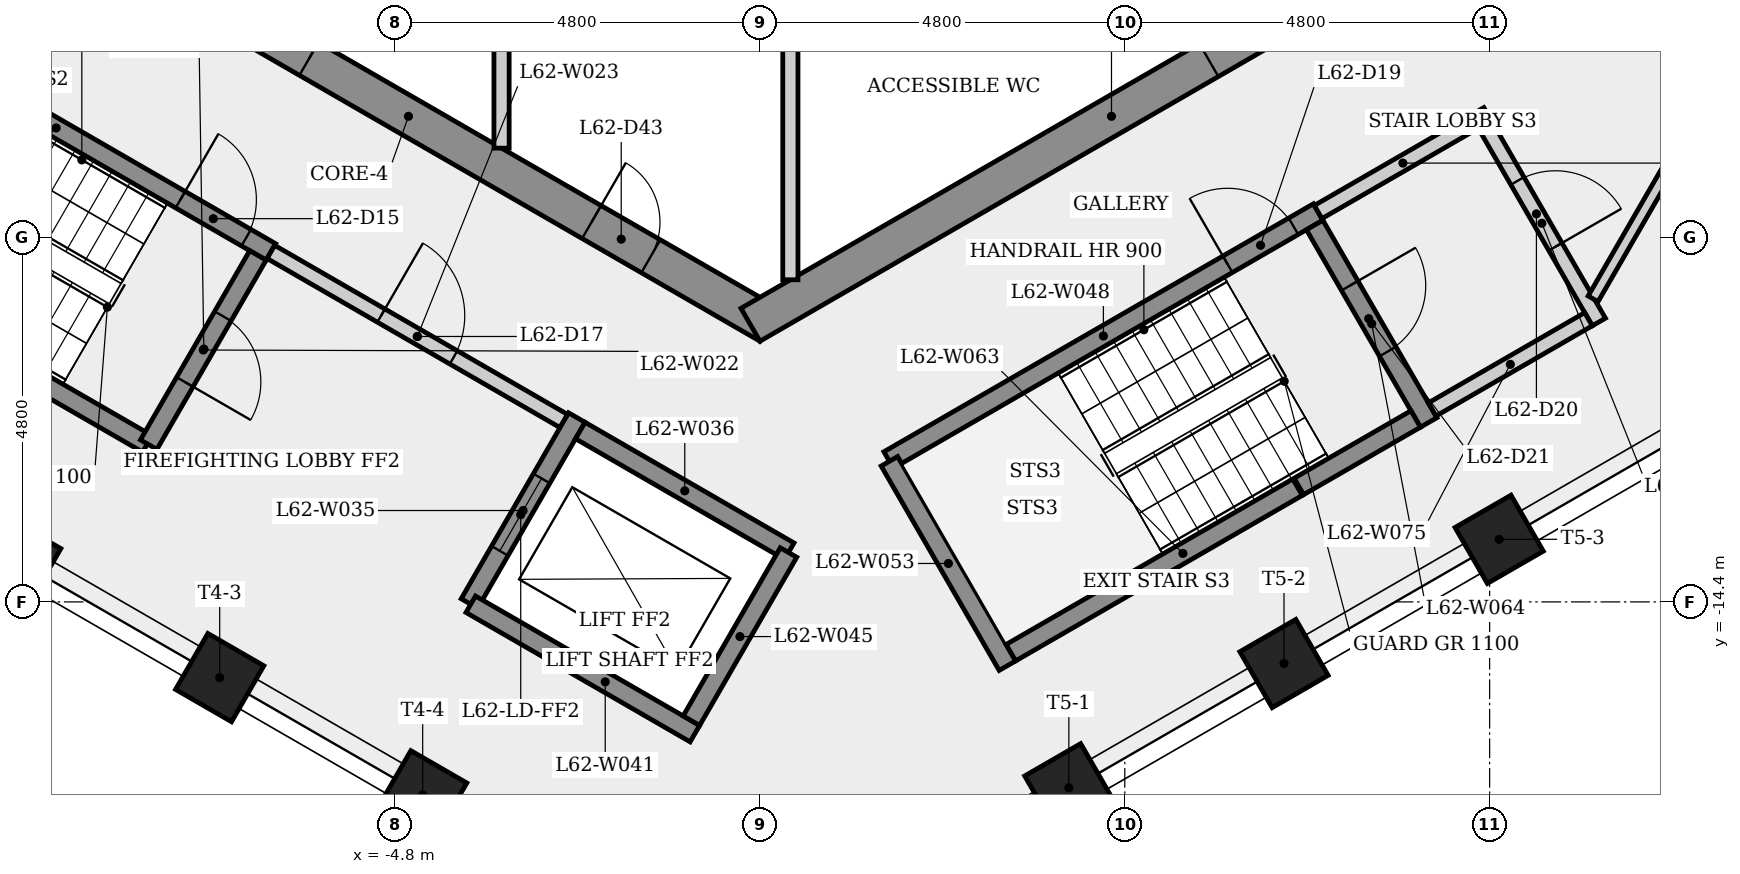
"""IFC4 building model, lengths in metres.
Left out: names, types, materials, properties, quantities, classifications, styles, units other than length and angle.
Written with IfcOpenShell. Run it as: python <this file> out.ifc"""

import sys

from ifc_helpers import new_model, si_unit, direction, frame, frame_2d, origin, origin_2d, place, context, subcontext, project, spatial, rectangle, extrude, element, fill, save


model = new_model("IFC4")
c1 = context("Model", 3, precision=1e-05, world=origin(), true_north=direction((0.0, 1.0)))
c2 = subcontext(c1, "Body", "Model", "MODEL_VIEW")
j1 = project(units=[si_unit("LENGTHUNIT", "METRE"), si_unit("PLANEANGLEUNIT", "RADIAN")], contexts=[c1])
p1 = place(None, origin())
s1 = spatial("IfcSite", under=j1, at=p1, CompositionType="ELEMENT")
p2 = place(p1, origin())
s2 = spatial("IfcBuilding", under=s1, at=p2, CompositionType="ELEMENT")
p3 = place(p2, frame((0.0, 0.0, 232.5)))
s3 = spatial("IfcBuildingStorey", under=s2, at=p3, CompositionType="ELEMENT", Elevation=232.5)
p4 = place(p3, frame((-9.375, -5.268, 0.0), z_axis=(0.0, 0.0, 1.0), x_axis=(0.866023993627, -0.500002442456, 0.0)))
e1 = element("IfcWall", 1, at=p4, inside=s3, PredefinedType="SHEAR", context=c2, shape_type="SweptSolid", body=[
    extrude(rectangle(XDim=10.97, YDim=0.5, at=frame_2d((5.485, 0.0))), origin(), (0.0, 0.0, 1.0), 3.4),
])
p5 = place(p4, frame((3.073, 0.0, 0.0)))
e2 = element("IfcOpeningElement", 2, at=p5, cuts=e1, PredefinedType="OPENING", context=c2, shape_type="SweptSolid", body=[
    extrude(rectangle(XDim=0.9, YDim=2.1, at=frame_2d((0.45, 1.05))), frame((0.0, 0.26, 0.0), z_axis=(0.0, -1.0, 0.0), x_axis=(1.0, 0.0, 0.0)), (0.0, 0.0, 1.0), 0.52),
])
p6 = place(p4, frame((8.267, 0.0, 0.0)))
e3 = element("IfcOpeningElement", 3, at=p6, cuts=e1, PredefinedType="OPENING", context=c2, shape_type="SweptSolid", body=[
    extrude(rectangle(XDim=0.9, YDim=2.1, at=frame_2d((0.45, 1.05))), frame((0.0, 0.26, 0.0), z_axis=(0.0, -1.0, 0.0), x_axis=(1.0, 0.0, 0.0)), (0.0, 0.0, 1.0), 0.52),
])
p7 = place(p3, frame((-0.125, -10.753, 0.0), z_axis=(0.0, 0.0, 1.0), x_axis=(0.866023993627, 0.500002442456, 0.0)))
e4 = element("IfcWall", 4, at=p7, inside=s3, PredefinedType="SHEAR", context=c2, shape_type="SweptSolid", body=[
    extrude(rectangle(XDim=10.97, YDim=0.5, at=frame_2d((5.485, 0.0))), origin(), (0.0, 0.0, 1.0), 3.4),
])
p8 = place(p7, frame((6.964, 0.0, 0.0)))
e5 = element("IfcOpeningElement", 5, at=p8, cuts=e4, PredefinedType="OPENING", context=c2, shape_type="SweptSolid", body=[
    extrude(rectangle(XDim=0.9, YDim=2.1, at=frame_2d((0.45, 1.05))), frame((0.0, 0.26, 0.0), z_axis=(0.0, -1.0, 0.0), x_axis=(1.0, 0.0, 0.0)), (0.0, 0.0, 1.0), 0.52),
])
for number, where, z_axis, x_axis in (
    (6, (-9.779, -13.854, 0.0), (0.0, 0.0, 1.0), (-0.5, -0.866, 0.0)),
    (7, (-7.108, -15.396, 0.0), (0.0, 0.0, 1.0), (-0.5, -0.866, 0.0)),
    (8, (-4.438, -16.938, 0.0), (0.0, 0.0, 1.0), (-0.5, -0.866, 0.0)),
    (9, (4.064, -16.845, 0.0), (0.0, 0.0, 1.0), (0.5, -0.866, 0.0)),
    (10, (6.895, -15.211, 0.0), (0.0, 0.0, 1.0), (0.5, -0.866, 0.0)),
    (11, (9.726, -13.576, 0.0), (0.0, 0.0, 1.0), (0.5, -0.866, 0.0)),
):
    element("IfcColumn", number, at=place(p3, frame(where, z_axis=z_axis, x_axis=x_axis)), inside=s3, PredefinedType="COLUMN", context=c2, shape_type="SweptSolid", body=[
        extrude(rectangle(XDim=0.85, YDim=0.85, at=origin_2d()), origin(), (0.0, 0.0, 1.0), 3.4),
    ])
p9 = place(p3, frame((-12.085, -6.532, 0.0), z_axis=(0.0, 0.0, 1.0), x_axis=(0.866031063448, -0.499990197047, 0.0)))
e12 = element("IfcWall", 12, at=p9, inside=s3, PredefinedType="SHEAR", context=c2, shape_type="SweptSolid", body=[
    extrude(rectangle(XDim=6.525, YDim=0.25, at=frame_2d((3.263, 0.0))), origin(), (0.0, 0.0, 1.0), 3.05),
])
p10 = place(p9, frame((5.15, 0.0, 0.0)))
e13 = element("IfcOpeningElement", 13, at=p10, cuts=e12, PredefinedType="OPENING", context=c2, shape_type="SweptSolid", body=[
    extrude(rectangle(XDim=1.0, YDim=2.1, at=frame_2d((0.5, 1.05))), frame((0.0, 0.135, 0.0), z_axis=(0.0, -1.0, 0.0), x_axis=(1.0, 0.0, 0.0)), (0.0, 0.0, 1.0), 0.27),
])
p11 = place(p3, frame((-8.06, -12.321, 0.0), z_axis=(0.0, 0.0, 1.0), x_axis=(-0.866029591389, 0.499992746786, 0.0)))
e14 = element("IfcWall", 14, at=p11, inside=s3, PredefinedType="SHEAR", context=c2, shape_type="SweptSolid", body=[
    extrude(rectangle(XDim=6.255, YDim=0.25, at=frame_2d((3.127, 0.0))), origin(), (0.0, 0.0, 1.0), 3.05),
])
p12 = place(p3, frame((-6.605, -9.841, 0.0), z_axis=(0.0, 0.0, 1.0), x_axis=(-0.500011588718, -0.866018712932, 0.0)))
e15 = element("IfcWall", 15, at=p12, inside=s3, PredefinedType="SHEAR", context=c2, shape_type="SweptSolid", body=[
    extrude(rectangle(XDim=2.875, YDim=0.25, at=frame_2d((1.438, 0.0))), origin(), (0.0, 0.0, 1.0), 3.05),
])
p13 = place(p12, frame((0.923, 0.0, 0.0)))
e16 = element("IfcOpeningElement", 16, at=p13, cuts=e15, PredefinedType="OPENING", context=c2, shape_type="SweptSolid", body=[
    extrude(rectangle(XDim=1.0, YDim=2.1, at=frame_2d((0.5, 1.05))), frame((0.0, 0.135, 0.0), z_axis=(0.0, -1.0, 0.0), x_axis=(1.0, 0.0, 0.0)), (0.0, 0.0, 1.0), 0.27),
])
p14 = place(p3, frame((-6.435, -9.795, 0.0), z_axis=(0.0, 0.0, 1.0), x_axis=(0.866012907634, -0.500021643343, 0.0)))
e17 = element("IfcWall", 17, at=p14, inside=s3, PredefinedType="PARTITIONING", context=c2, shape_type="SweptSolid", body=[
    extrude(rectangle(XDim=4.45, YDim=0.2, at=frame_2d((2.225, 0.0))), origin(), (0.0, 0.0, 1.0), 3.05),
])
p15 = place(p14, frame((1.675, 0.0, 0.0)))
e18 = element("IfcOpeningElement", 18, at=p15, cuts=e17, PredefinedType="OPENING", context=c2, shape_type="SweptSolid", body=[
    extrude(rectangle(XDim=1.1, YDim=2.1, at=frame_2d((0.55, 1.05))), frame((0.0, 0.11, 0.0), z_axis=(0.0, -1.0, 0.0), x_axis=(1.0, 0.0, 0.0)), (0.0, 0.0, 1.0), 0.22),
])
p16 = place(p3, frame((-3.4, -5.25, 0.0), z_axis=(0.0, 0.0, 1.0), x_axis=(0.0, -1.0, 0.0)))
e19 = element("IfcWall", 19, at=p16, inside=s3, PredefinedType="PARTITIONING", context=c2, shape_type="SweptSolid", body=[
    extrude(rectangle(XDim=3.179, YDim=0.2, at=frame_2d((1.59, 0.0))), origin(), (0.0, 0.0, 1.0), 3.05),
])
p17 = place(p3, frame((-2.41, -11.974, 0.0), z_axis=(0.0, 0.0, 1.0), x_axis=(-0.49998675294, -0.866033051843, 0.0)))
e20 = element("IfcWall", 20, at=p17, inside=s3, PredefinedType="SHEAR", context=c2, shape_type="SweptSolid", body=[
    extrude(rectangle(XDim=2.825, YDim=0.25, at=frame_2d((1.413, 0.0))), origin(), (0.0, 0.0, 1.0), 3.05),
])
p18 = place(p17, frame((0.926, 0.0, 0.0)))
e21 = element("IfcOpeningElement", 21, at=p18, cuts=e20, PredefinedType="OPENING", context=c2, shape_type="SweptSolid", body=[
    extrude(rectangle(XDim=1.1, YDim=2.1, at=frame_2d((0.55, 1.05))), frame((0.0, 0.135, 0.0), z_axis=(0.0, -1.0, 0.0), x_axis=(1.0, 0.0, 0.0)), (0.0, 0.0, 1.0), 0.27),
])
p19 = place(p3, frame((-2.364, -12.145, 0.0), z_axis=(0.0, 0.0, 1.0), x_axis=(0.866048579423, -0.499959856469, 0.0)))
e22 = element("IfcWall", 22, at=p19, inside=s3, PredefinedType="SHEAR", context=c2, shape_type="SweptSolid", body=[
    extrude(rectangle(XDim=3.175, YDim=0.25, at=frame_2d((1.587, 0.0))), origin(), (0.0, 0.0, 1.0), 3.4),
])
p20 = place(p3, frame((-0.856, -16.133, 0.0), z_axis=(0.0, 0.0, 1.0), x_axis=(-0.866032748241, 0.499987278812, 0.0)))
e23 = element("IfcWall", 23, at=p20, inside=s3, PredefinedType="SHEAR", context=c2, shape_type="SweptSolid", body=[
    extrude(rectangle(XDim=3.405, YDim=0.25, at=frame_2d((1.702, 0.0))), origin(), (0.0, 0.0, 1.0), 3.05),
])
p21 = place(p3, frame((0.375, -13.75, 0.0), z_axis=(0.0, 0.0, 1.0), x_axis=(-0.50003400563, -0.866005769735, 0.0)))
e24 = element("IfcWall", 24, at=p21, inside=s3, PredefinedType="SHEAR", context=c2, shape_type="SweptSolid", body=[
    extrude(rectangle(XDim=2.555, YDim=0.25, at=frame_2d((1.277, 0.0))), origin(), (0.0, 0.0, 1.0), 3.4),
])
p22 = place(p3, frame((0.4, -5.25, 0.0), z_axis=(0.0, 0.0, 1.0), x_axis=(0.0, -1.0, 0.0)))
e25 = element("IfcWall", 25, at=p22, inside=s3, PredefinedType="PARTITIONING", context=c2, shape_type="SweptSolid", body=[
    extrude(rectangle(XDim=4.911, YDim=0.2, at=frame_2d((2.456, 0.0))), origin(), (0.0, 0.0, 1.0), 3.05),
])
p23 = place(p3, frame((1.693, -12.532, 0.0), z_axis=(0.0, 0.0, 1.0), x_axis=(0.866031063448, 0.499990197047, 0.0)))
e26 = element("IfcWall", 26, at=p23, inside=s3, PredefinedType="SHEAR", context=c2, shape_type="SweptSolid", body=[
    extrude(rectangle(XDim=6.525, YDim=0.25, at=frame_2d((3.263, 0.0))), origin(), (0.0, 0.0, 1.0), 3.05),
])
p24 = place(p23, frame((5.15, 0.0, 0.0)))
e27 = element("IfcOpeningElement", 27, at=p24, cuts=e26, PredefinedType="OPENING", context=c2, shape_type="SweptSolid", body=[
    extrude(rectangle(XDim=1.0, YDim=2.1, at=frame_2d((0.5, 1.05))), frame((0.0, 0.135, 0.0), z_axis=(0.0, -1.0, 0.0), x_axis=(1.0, 0.0, 0.0)), (0.0, 0.0, 1.0), 0.27),
])
p25 = place(p3, frame((3.256, -15.239, 0.0), z_axis=(0.0, 0.0, 1.0), x_axis=(-0.500003782172, 0.866023220135, 0.0)))
e28 = element("IfcWall", 28, at=p25, inside=s3, PredefinedType="SHEAR", context=c2, shape_type="SweptSolid", body=[
    extrude(rectangle(XDim=3.105, YDim=0.25, at=frame_2d((1.552, 0.0))), origin(), (0.0, 0.0, 1.0), 3.05),
])
p26 = place(p3, frame((7.073, -12.891, 0.0), z_axis=(0.0, 0.0, 1.0), x_axis=(-0.866023145199, -0.500003911965, 0.0)))
e29 = element("IfcWall", 29, at=p26, inside=s3, PredefinedType="SHEAR", context=c2, shape_type="SweptSolid", body=[
    extrude(rectangle(XDim=4.355, YDim=0.25, at=frame_2d((2.177, 0.0))), origin(), (0.0, 0.0, 1.0), 3.05),
])
p27 = place(p3, frame((7.298, -9.441, 0.0), z_axis=(0.0, 0.0, 1.0), x_axis=(0.50002537861, -0.866010750942, 0.0)))
e30 = element("IfcWall", 30, at=p27, inside=s3, PredefinedType="SHEAR", context=c2, shape_type="SweptSolid", body=[
    extrude(rectangle(XDim=3.0, YDim=0.25, at=frame_2d((1.5, 0.0))), origin(), (0.0, 0.0, 1.0), 3.05),
])
p28 = place(p27, frame((0.923, 0.0, 0.0)))
e31 = element("IfcOpeningElement", 31, at=p28, cuts=e30, PredefinedType="OPENING", context=c2, shape_type="SweptSolid", body=[
    extrude(rectangle(XDim=1.0, YDim=2.1, at=frame_2d((0.5, 1.05))), frame((0.0, 0.135, 0.0), z_axis=(0.0, -1.0, 0.0), x_axis=(1.0, 0.0, 0.0)), (0.0, 0.0, 1.0), 0.27),
])
p29 = place(p3, frame((7.344, -9.27, 0.0), z_axis=(0.0, 0.0, 1.0), x_axis=(0.866005588531, 0.500034319456, 0.0)))
e32 = element("IfcWall", 32, at=p29, inside=s3, PredefinedType="PARTITIONING", context=c2, shape_type="SweptSolid", body=[
    extrude(rectangle(XDim=2.575, YDim=0.2, at=frame_2d((1.288, 0.0))), origin(), (0.0, 0.0, 1.0), 3.05),
])
p30 = place(p3, frame((8.627, -11.993, 0.0), z_axis=(0.0, 0.0, 1.0), x_axis=(-0.866059624469, -0.499940723351, 0.0)))
e33 = element("IfcWall", 33, at=p30, inside=s3, PredefinedType="SHEAR", context=c2, shape_type="SweptSolid", body=[
    extrude(rectangle(XDim=1.775, YDim=0.25, at=frame_2d((0.888, 0.0))), origin(), (0.0, 0.0, 1.0), 3.05),
])
p31 = place(p3, frame((9.537, -8.119, 0.0), z_axis=(0.0, 0.0, 1.0), x_axis=(0.499990139034, -0.866031096941, 0.0)))
e34 = element("IfcWall", 34, at=p31, inside=s3, PredefinedType="PARTITIONING", context=c2, shape_type="SweptSolid", body=[
    extrude(rectangle(XDim=3.0, YDim=0.2, at=frame_2d((1.5, 0.0))), origin(), (0.0, 0.0, 1.0), 3.05),
])
p32 = place(p31, frame((0.857, 0.0, 0.0)))
e35 = element("IfcOpeningElement", 35, at=p32, cuts=e34, PredefinedType="OPENING", context=c2, shape_type="SweptSolid", body=[
    extrude(rectangle(XDim=1.0, YDim=2.1, at=frame_2d((0.5, 1.05))), frame((0.0, 0.11, 0.0), z_axis=(0.0, -1.0, 0.0), x_axis=(1.0, 0.0, 0.0)), (0.0, 0.0, 1.0), 0.22),
])
p33 = place(p3, frame((10.901, -10.681, 0.0), z_axis=(0.0, 0.0, 1.0), x_axis=(-0.866007538022, -0.500030943131, 0.0)))
e36 = element("IfcWall", 36, at=p33, inside=s3, PredefinedType="PARTITIONING", context=c2, shape_type="SweptSolid", body=[
    extrude(rectangle(XDim=2.375, YDim=0.2, at=frame_2d((1.188, 0.0))), origin(), (0.0, 0.0, 1.0), 3.05),
])
p34 = place(p3, frame((14.253, -4.711, 0.0), z_axis=(0.0, 0.0, 1.0), x_axis=(-0.500008173903, -0.866020684528, 0.0)))
e37 = element("IfcWall", 37, at=p34, inside=s3, PredefinedType="PARTITIONING", context=c2, shape_type="SweptSolid", body=[
    extrude(rectangle(XDim=6.583, YDim=0.15, at=frame_2d((3.292, 0.0))), origin(), (0.0, 0.0, 1.0), 3.05),
])
p35 = place(p34, frame((2.792, 0.0, 0.0)))
e38 = element("IfcOpeningElement", 38, at=p35, cuts=e37, PredefinedType="OPENING", context=c2, shape_type="SweptSolid", body=[
    extrude(rectangle(XDim=1.0, YDim=2.1, at=frame_2d((0.5, 1.05))), frame((0.0, 0.085, 0.0), z_axis=(0.0, -1.0, 0.0), x_axis=(1.0, 0.0, 0.0)), (0.0, 0.0, 1.0), 0.17),
])
p36 = place(p10, origin())
e39 = element("IfcDoor", 39, at=p36, inside=s3, OperationType="SINGLE_SWING_LEFT", PredefinedType="DOOR", context=c2, shape_type="SweptSolid", body=[
    extrude(rectangle(XDim=1.0, YDim=2.1, at=frame_2d((0.5, 1.05))), frame((0.0, 0.025, 0.0), z_axis=(0.0, -1.0, 0.0), x_axis=(1.0, 0.0, 0.0)), (0.0, 0.0, 1.0), 0.05),
])
fill(e13, e39)
p37 = place(p13, origin())
e40 = element("IfcDoor", 40, at=p37, inside=s3, OperationType="SINGLE_SWING_RIGHT", PredefinedType="DOOR", context=c2, shape_type="SweptSolid", body=[
    extrude(rectangle(XDim=1.0, YDim=2.1, at=frame_2d((0.5, 1.05))), frame((0.0, 0.025, 0.0), z_axis=(0.0, -1.0, 0.0), x_axis=(1.0, 0.0, 0.0)), (0.0, 0.0, 1.0), 0.05),
])
fill(e16, e40)
p38 = place(p15, origin())
e41 = element("IfcDoor", 41, at=p38, inside=s3, OperationType="SINGLE_SWING_LEFT", PredefinedType="DOOR", context=c2, shape_type="SweptSolid", body=[
    extrude(rectangle(XDim=1.1, YDim=2.1, at=frame_2d((0.55, 1.05))), frame((0.0, 0.025, 0.0), z_axis=(0.0, -1.0, 0.0), x_axis=(1.0, 0.0, 0.0)), (0.0, 0.0, 1.0), 0.05),
])
fill(e18, e41)
p39 = place(p18, origin())
e42 = element("IfcDoor", 42, at=p39, inside=s3, OperationType="SLIDING_TO_LEFT", PredefinedType="DOOR", context=c2, shape_type="SweptSolid", body=[
    extrude(rectangle(XDim=1.1, YDim=2.1, at=frame_2d((0.55, 1.05))), frame((0.0, 0.025, 0.0), z_axis=(0.0, -1.0, 0.0), x_axis=(1.0, 0.0, 0.0)), (0.0, 0.0, 1.0), 0.05),
])
fill(e21, e42)
p40 = place(p24, origin())
e43 = element("IfcDoor", 43, at=p40, inside=s3, OperationType="SINGLE_SWING_LEFT", PredefinedType="DOOR", context=c2, shape_type="SweptSolid", body=[
    extrude(rectangle(XDim=1.0, YDim=2.1, at=frame_2d((0.5, 1.05))), frame((0.0, 0.025, 0.0), z_axis=(0.0, -1.0, 0.0), x_axis=(1.0, 0.0, 0.0)), (0.0, 0.0, 1.0), 0.05),
])
fill(e27, e43)
p41 = place(p32, origin())
e44 = element("IfcDoor", 44, at=p41, inside=s3, OperationType="SINGLE_SWING_RIGHT", PredefinedType="DOOR", context=c2, shape_type="SweptSolid", body=[
    extrude(rectangle(XDim=1.0, YDim=2.1, at=frame_2d((0.5, 1.05))), frame((0.0, 0.025, 0.0), z_axis=(0.0, -1.0, 0.0), x_axis=(1.0, 0.0, 0.0)), (0.0, 0.0, 1.0), 0.05),
])
fill(e35, e44)
p42 = place(p28, origin())
e45 = element("IfcDoor", 45, at=p42, inside=s3, OperationType="SINGLE_SWING_LEFT", PredefinedType="DOOR", context=c2, shape_type="SweptSolid", body=[
    extrude(rectangle(XDim=1.0, YDim=2.1, at=frame_2d((0.5, 1.05))), frame((0.0, 0.025, 0.0), z_axis=(0.0, -1.0, 0.0), x_axis=(1.0, 0.0, 0.0)), (0.0, 0.0, 1.0), 0.05),
])
fill(e31, e45)
p43 = place(p5, origin())
e46 = element("IfcDoor", 46, at=p43, inside=s3, OperationType="SINGLE_SWING_RIGHT", PredefinedType="DOOR", context=c2, shape_type="SweptSolid", body=[
    extrude(rectangle(XDim=0.9, YDim=2.1, at=frame_2d((0.45, 1.05))), frame((0.0, 0.025, 0.0), z_axis=(0.0, -1.0, 0.0), x_axis=(1.0, 0.0, 0.0)), (0.0, 0.0, 1.0), 0.05),
])
fill(e2, e46)
p44 = place(p6, origin())
e47 = element("IfcDoor", 47, at=p44, inside=s3, OperationType="SINGLE_SWING_LEFT", PredefinedType="DOOR", context=c2, shape_type="SweptSolid", body=[
    extrude(rectangle(XDim=0.9, YDim=2.1, at=frame_2d((0.45, 1.05))), frame((0.0, 0.025, 0.0), z_axis=(0.0, -1.0, 0.0), x_axis=(1.0, 0.0, 0.0)), (0.0, 0.0, 1.0), 0.05),
])
fill(e3, e47)
p45 = place(p8, origin())
e48 = element("IfcDoor", 48, at=p45, inside=s3, OperationType="SINGLE_SWING_RIGHT", PredefinedType="DOOR", context=c2, shape_type="SweptSolid", body=[
    extrude(rectangle(XDim=0.9, YDim=2.1, at=frame_2d((0.45, 1.05))), frame((0.0, 0.025, 0.0), z_axis=(0.0, -1.0, 0.0), x_axis=(1.0, 0.0, 0.0)), (0.0, 0.0, 1.0), 0.05),
])
fill(e5, e48)
save(model, sys.argv[1])
